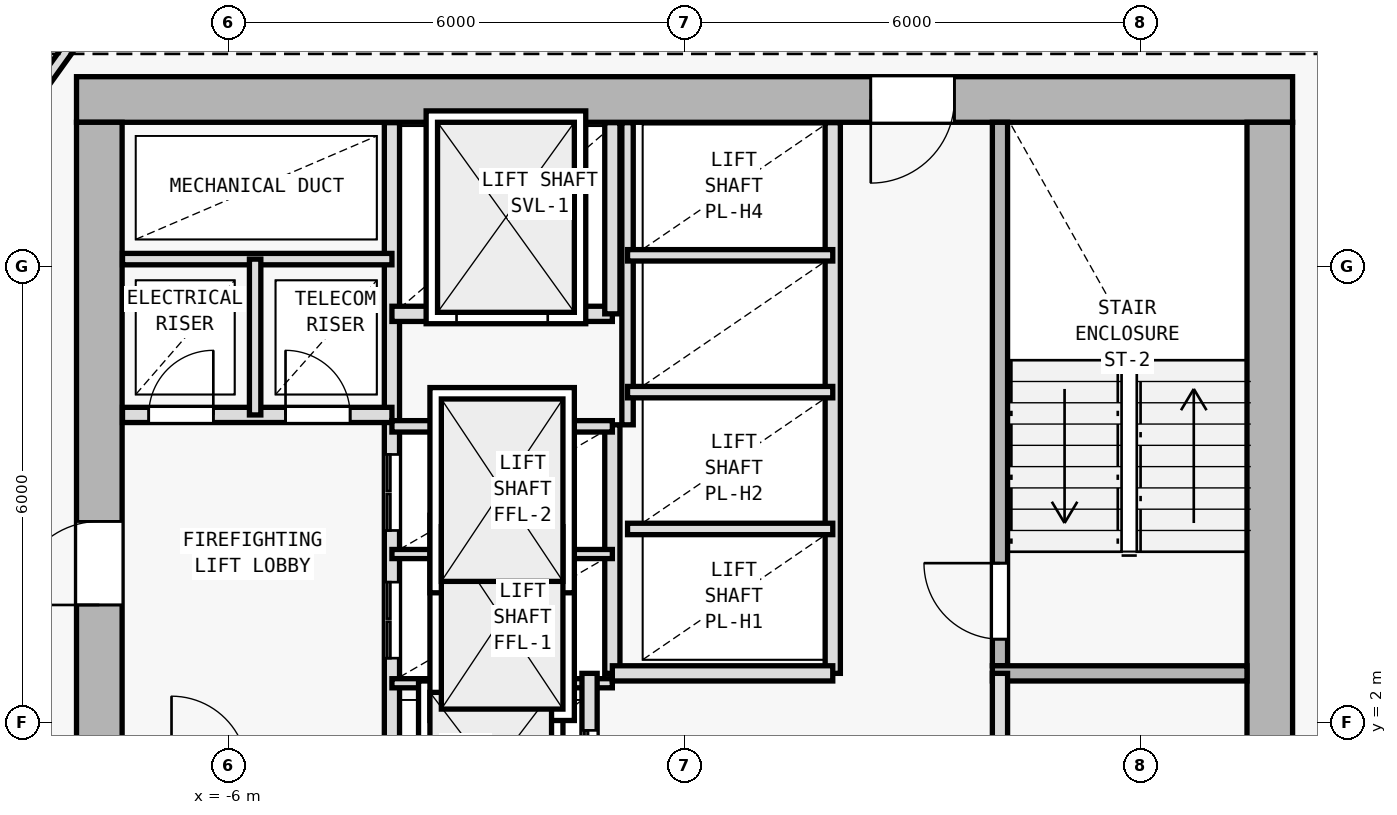
"""IFC4 building model, lengths in metres.
Left out: names, types, materials, properties, quantities, classifications, styles, units other than length and angle.
Written with IfcOpenShell. Run it as: python <this file> out.ifc"""

import sys

from ifc_helpers import new_model, si_unit, direction, frame, frame_2d, origin, origin_2d, place, context, subcontext, project, spatial, rectangle, i_section, extrude, element, fill, save


model = new_model("IFC4")
c1 = context("Model", 3, precision=1e-05, world=origin(), true_north=direction((0.0, 1.0)))
c2 = subcontext(c1, "Body", "Model", "MODEL_VIEW")
j1 = project(units=[si_unit("LENGTHUNIT", "METRE"), si_unit("PLANEANGLEUNIT", "RADIAN")], contexts=[c1])
p1 = place(None, origin())
s1 = spatial("IfcSite", under=j1, at=p1, CompositionType="ELEMENT")
p2 = place(p1, origin())
s2 = spatial("IfcBuilding", under=s1, at=p2, CompositionType="ELEMENT")
p3 = place(p2, frame((0.0, 0.0, 118.5)))
s3 = spatial("IfcBuildingStorey", under=s2, at=p3, CompositionType="ELEMENT", Elevation=118.5)
for number, where, z_axis, x_axis in (
    (1, (7.7, 10.2, 0.0), (0.0, 0.0, 1.0), (1.0, 0.0, 0.0)),
    (2, (-7.7, 10.2, 0.0), (0.0, 0.0, 1.0), (1.0, 0.0, 0.0)),
    (3, (-7.7, 2.0, 0.0), (0.0, 0.0, 1.0), (1.0, 0.0, 0.0)),
):
    element("IfcColumn", number, at=place(p3, frame(where, z_axis=z_axis, x_axis=x_axis)), inside=s3, PredefinedType="COLUMN", context=c2, shape_type="SweptSolid", body=[
        extrude(i_section(OverallWidth=0.409, OverallDepth=0.425, WebThickness=0.021, FlangeThickness=0.034, FilletRadius=0.015, at=origin_2d()), origin(), (0.0, 0.0, 1.0), 3.6),
    ])
p4 = place(p3, frame((8.0, 10.2, 0.0), z_axis=(0.0, 0.0, 1.0), x_axis=(-1.0, 0.0, 0.0)))
e4 = element("IfcWall", 4, at=p4, inside=s3, PredefinedType="SHEAR", context=c2, shape_type="SweptSolid", body=[
    extrude(rectangle(XDim=16.0, YDim=0.6, at=frame_2d((8.0, 0.0))), origin(), (0.0, 0.0, 1.0), 3.35),
])
p5 = place(p4, frame((4.45, 0.0, 0.0)))
e5 = element("IfcOpeningElement", 5, at=p5, cuts=e4, PredefinedType="OPENING", context=c2, shape_type="SweptSolid", body=[
    extrude(rectangle(XDim=1.1, YDim=2.15, at=frame_2d((0.55, 1.075))), frame((0.0, 0.31, 0.0), z_axis=(0.0, -1.0, 0.0), x_axis=(1.0, 0.0, 0.0)), (0.0, 0.0, 1.0), 0.62),
])
p6 = place(p3, frame((-7.7, -9.1, 0.0), z_axis=(0.0, 0.0, 1.0), x_axis=(0.0, 1.0, 0.0)))
e6 = element("IfcWall", 6, at=p6, inside=s3, PredefinedType="SHEAR", context=c2, shape_type="SweptSolid", body=[
    extrude(rectangle(XDim=19.0, YDim=0.6, at=frame_2d((9.5, 0.0))), origin(), (0.0, 0.0, 1.0), 3.35),
])
p7 = place(p6, frame((12.65, 0.0, 0.0)))
e7 = element("IfcOpeningElement", 7, at=p7, cuts=e6, PredefinedType="OPENING", context=c2, shape_type="SweptSolid", body=[
    extrude(rectangle(XDim=1.1, YDim=2.15, at=frame_2d((0.55, 1.075))), frame((0.0, 0.31, 0.0), z_axis=(0.0, -1.0, 0.0), x_axis=(1.0, 0.0, 0.0)), (0.0, 0.0, 1.0), 0.62),
])
p8 = place(p3, frame((7.7, 9.9, 0.0), z_axis=(0.0, 0.0, 1.0), x_axis=(0.0, -1.0, 0.0)))
e8 = element("IfcWall", 8, at=p8, inside=s3, PredefinedType="SHEAR", context=c2, shape_type="SweptSolid", body=[
    extrude(rectangle(XDim=19.0, YDim=0.6, at=frame_2d((9.5, 0.0))), origin(), (0.0, 0.0, 1.0), 3.35),
])
p9 = place(p3, frame((-3.85, 1.35, 0.0), z_axis=(0.0, 0.0, 1.0), x_axis=(0.0, 1.0, 0.0)))
e9 = element("IfcWall", 9, at=p9, inside=s3, PredefinedType="SOLIDWALL", context=c2, shape_type="SweptSolid", body=[
    extrude(rectangle(XDim=8.545, YDim=0.2, at=frame_2d((4.272, 0.0))), origin(), (0.0, 0.0, 1.0), 3.35),
])
p10 = place(p9, frame((1.5, 0.0, 0.0)))
e10 = element("IfcOpeningElement", 10, at=p10, cuts=e9, PredefinedType="OPENING", context=c2, shape_type="SweptSolid", body=[
    extrude(rectangle(XDim=1.0, YDim=2.15, at=frame_2d((0.5, 1.075))), frame((0.0, 0.11, 0.0), z_axis=(0.0, -1.0, 0.0), x_axis=(1.0, 0.0, 0.0)), (0.0, 0.0, 1.0), 0.22),
])
p11 = place(p9, frame((3.18, 0.0, 0.0)))
e11 = element("IfcOpeningElement", 11, at=p11, cuts=e9, PredefinedType="OPENING", context=c2, shape_type="SweptSolid", body=[
    extrude(rectangle(XDim=1.0, YDim=2.15, at=frame_2d((0.5, 1.075))), frame((0.0, 0.11, 0.0), z_axis=(0.0, -1.0, 0.0), x_axis=(1.0, 0.0, 0.0)), (0.0, 0.0, 1.0), 0.22),
])
p12 = place(p3, frame((-7.395, 6.05, 0.0), z_axis=(0.0, 0.0, 1.0), x_axis=(1.0, 0.0, 0.0)))
e12 = element("IfcWall", 12, at=p12, inside=s3, PredefinedType="SOLIDWALL", context=c2, shape_type="SweptSolid", body=[
    extrude(rectangle(XDim=3.545, YDim=0.2, at=frame_2d((1.772, 0.0))), origin(), (0.0, 0.0, 1.0), 3.35),
])
p13 = place(p12, frame((0.345, 0.0, 0.0)))
e13 = element("IfcOpeningElement", 13, at=p13, cuts=e12, PredefinedType="OPENING", context=c2, shape_type="SweptSolid", body=[
    extrude(rectangle(XDim=0.85, YDim=2.1, at=frame_2d((0.425, 1.05))), frame((0.0, 0.11, 0.0), z_axis=(0.0, -1.0, 0.0), x_axis=(1.0, 0.0, 0.0)), (0.0, 0.0, 1.0), 0.22),
])
p14 = place(p12, frame((2.145, 0.0, 0.0)))
e14 = element("IfcOpeningElement", 14, at=p14, cuts=e12, PredefinedType="OPENING", context=c2, shape_type="SweptSolid", body=[
    extrude(rectangle(XDim=0.85, YDim=2.1, at=frame_2d((0.425, 1.05))), frame((0.0, 0.11, 0.0), z_axis=(0.0, -1.0, 0.0), x_axis=(1.0, 0.0, 0.0)), (0.0, 0.0, 1.0), 0.22),
])
p15 = place(p3, frame((-7.395, 8.1, 0.0), z_axis=(0.0, 0.0, 1.0), x_axis=(1.0, 0.0, 0.0)))
e15 = element("IfcWall", 15, at=p15, inside=s3, PredefinedType="PARTITIONING", context=c2, shape_type="SweptSolid", body=[
    extrude(rectangle(XDim=3.545, YDim=0.15, at=frame_2d((1.772, 0.0))), origin(), (0.0, 0.0, 1.0), 3.35),
])
p16 = place(p3, frame((-5.65, 6.05, 0.0), z_axis=(0.0, 0.0, 1.0), x_axis=(0.0, 1.0, 0.0)))
e16 = element("IfcWall", 16, at=p16, inside=s3, PredefinedType="PARTITIONING", context=c2, shape_type="SweptSolid", body=[
    extrude(rectangle(XDim=2.05, YDim=0.15, at=frame_2d((1.025, 0.0))), origin(), (0.0, 0.0, 1.0), 3.35),
])
p17 = place(p3, frame((4.15, 2.75, 0.0), z_axis=(0.0, 0.0, 1.0), x_axis=(0.0, 1.0, 0.0)))
e17 = element("IfcWall", 17, at=p17, inside=s3, PredefinedType="SOLIDWALL", context=c2, shape_type="SweptSolid", body=[
    extrude(rectangle(XDim=7.15, YDim=0.2, at=frame_2d((3.575, 0.0))), origin(), (0.0, 0.0, 1.0), 3.35),
])
p18 = place(p17, frame((0.35, 0.0, 0.0)))
e18 = element("IfcOpeningElement", 18, at=p18, cuts=e17, PredefinedType="OPENING", context=c2, shape_type="SweptSolid", body=[
    extrude(rectangle(XDim=1.0, YDim=2.15, at=frame_2d((0.5, 1.075))), frame((0.0, 0.11, 0.0), z_axis=(0.0, -1.0, 0.0), x_axis=(1.0, 0.0, 0.0)), (0.0, 0.0, 1.0), 0.22),
])
p19 = place(p3, frame((4.05, 2.65, 0.0), z_axis=(0.0, 0.0, 1.0), x_axis=(1.0, 0.0, 0.0)))
e19 = element("IfcWall", 19, at=p19, inside=s3, PredefinedType="SOLIDWALL", context=c2, shape_type="SweptSolid", body=[
    extrude(rectangle(XDim=3.35, YDim=0.2, at=frame_2d((1.675, 0.0))), origin(), (0.0, 0.0, 1.0), 3.35),
])
p20 = place(p3, frame((-0.95, 2.65, 0.0), z_axis=(0.0, 0.0, 1.0), x_axis=(0.0, 1.0, 0.0)))
e20 = element("IfcWall", 20, at=p20, inside=s3, PredefinedType="SOLIDWALL", context=c2, shape_type="SweptSolid", body=[
    extrude(rectangle(XDim=3.27, YDim=0.2, at=frame_2d((1.635, 0.0))), origin(), (0.0, 0.0, 1.0), 3.35),
])
for number, where, z_axis, x_axis in (
    (21, (-3.85, 2.52, 0.0), (0.0, 0.0, 1.0), (1.0, 0.0, 0.0)),
    (22, (-3.85, 4.22, 0.0), (0.0, 0.0, 1.0), (1.0, 0.0, 0.0)),
):
    element("IfcWall", number, at=place(p3, frame(where, z_axis=z_axis, x_axis=x_axis)), inside=s3, PredefinedType="PARTITIONING", context=c2, shape_type="SweptSolid", body=[
        extrude(rectangle(XDim=2.9, YDim=0.12, at=frame_2d((1.45, 0.0))), origin(), (0.0, 0.0, 1.0), 3.35),
    ])
p21 = place(p3, frame((-3.85, 5.9, 0.0), z_axis=(0.0, 0.0, 1.0), x_axis=(1.0, 0.0, 0.0)))
e23 = element("IfcWall", 23, at=p21, inside=s3, PredefinedType="PARTITIONING", context=c2, shape_type="SweptSolid", body=[
    extrude(rectangle(XDim=2.9, YDim=0.15, at=frame_2d((1.45, 0.0))), origin(), (0.0, 0.0, 1.0), 3.35),
])
p22 = place(p3, frame((-3.85, 7.38, 0.0), z_axis=(0.0, 0.0, 1.0), x_axis=(1.0, 0.0, 0.0)))
e24 = element("IfcWall", 24, at=p22, inside=s3, PredefinedType="SOLIDWALL", context=c2, shape_type="SweptSolid", body=[
    extrude(rectangle(XDim=2.9, YDim=0.2, at=frame_2d((1.45, 0.0))), origin(), (0.0, 0.0, 1.0), 3.35),
])
p23 = place(p22, frame((0.85, 0.0, 0.0)))
e25 = element("IfcOpeningElement", 25, at=p23, cuts=e24, PredefinedType="OPENING", context=c2, shape_type="SweptSolid", body=[
    extrude(rectangle(XDim=1.2, YDim=2.2, at=frame_2d((0.6, 1.1))), frame((0.0, 0.11, 0.0), z_axis=(0.0, -1.0, 0.0), x_axis=(1.0, 0.0, 0.0)), (0.0, 0.0, 1.0), 0.22),
])
p24 = place(p3, frame((-0.95, 7.38, 0.0), z_axis=(0.0, 0.0, 1.0), x_axis=(0.0, 1.0, 0.0)))
e26 = element("IfcWall", 26, at=p24, inside=s3, PredefinedType="SOLIDWALL", context=c2, shape_type="SweptSolid", body=[
    extrude(rectangle(XDim=2.515, YDim=0.2, at=frame_2d((1.258, 0.0))), origin(), (0.0, 0.0, 1.0), 3.35),
])
p25 = place(p3, frame((4.15, -6.05, 0.0), z_axis=(0.0, 0.0, 1.0), x_axis=(0.0, 1.0, 0.0)))
e27 = element("IfcWall", 27, at=p25, inside=s3, PredefinedType="SOLIDWALL", context=c2, shape_type="SweptSolid", body=[
    extrude(rectangle(XDim=8.7, YDim=0.2, at=frame_2d((4.35, 0.0))), origin(), (0.0, 0.0, 1.0), 3.35),
])
p26 = place(p25, frame((3.6, 0.0, 0.0)))
e28 = element("IfcOpeningElement", 28, at=p26, cuts=e27, PredefinedType="OPENING", context=c2, shape_type="SweptSolid", body=[
    extrude(rectangle(XDim=0.95, YDim=2.1, at=frame_2d((0.475, 1.05))), frame((0.0, 0.11, 0.0), z_axis=(0.0, -1.0, 0.0), x_axis=(1.0, 0.0, 0.0)), (0.0, 0.0, 1.0), 0.22),
])
p27 = place(p3, frame((-1.25, -6.05, 0.0), z_axis=(0.0, 0.0, 1.0), x_axis=(0.0, 1.0, 0.0)))
e29 = element("IfcWall", 29, at=p27, inside=s3, PredefinedType="SOLIDWALL", context=c2, shape_type="SweptSolid", body=[
    extrude(rectangle(XDim=8.7, YDim=0.2, at=frame_2d((4.35, 0.0))), origin(), (0.0, 0.0, 1.0), 3.35),
])
p28 = place(p27, frame((0.55, 0.0, 0.0)))
e30 = element("IfcOpeningElement", 30, at=p28, cuts=e29, PredefinedType="OPENING", context=c2, shape_type="SweptSolid", body=[
    extrude(rectangle(XDim=1.1, YDim=2.15, at=frame_2d((0.55, 1.075))), frame((0.0, 0.11, 0.0), z_axis=(0.0, -1.0, 0.0), x_axis=(1.0, 0.0, 0.0)), (0.0, 0.0, 1.0), 0.22),
])
p29 = place(p27, frame((2.65, 0.0, 0.0)))
e31 = element("IfcOpeningElement", 31, at=p29, cuts=e29, PredefinedType="OPENING", context=c2, shape_type="SweptSolid", body=[
    extrude(rectangle(XDim=1.1, YDim=2.15, at=frame_2d((0.55, 1.075))), frame((0.0, 0.11, 0.0), z_axis=(0.0, -1.0, 0.0), x_axis=(1.0, 0.0, 0.0)), (0.0, 0.0, 1.0), 0.22),
])
p30 = place(p27, frame((4.75, 0.0, 0.0)))
e32 = element("IfcOpeningElement", 32, at=p30, cuts=e29, PredefinedType="OPENING", context=c2, shape_type="SweptSolid", body=[
    extrude(rectangle(XDim=1.1, YDim=2.15, at=frame_2d((0.55, 1.075))), frame((0.0, 0.11, 0.0), z_axis=(0.0, -1.0, 0.0), x_axis=(1.0, 0.0, 0.0)), (0.0, 0.0, 1.0), 0.22),
])
p31 = place(p27, frame((6.85, 0.0, 0.0)))
e33 = element("IfcOpeningElement", 33, at=p31, cuts=e29, PredefinedType="OPENING", context=c2, shape_type="SweptSolid", body=[
    extrude(rectangle(XDim=1.1, YDim=2.15, at=frame_2d((0.55, 1.075))), frame((0.0, 0.11, 0.0), z_axis=(0.0, -1.0, 0.0), x_axis=(1.0, 0.0, 0.0)), (0.0, 0.0, 1.0), 0.22),
])
p32 = place(p3, frame((1.95, 2.65, 0.0), z_axis=(0.0, 0.0, 1.0), x_axis=(0.0, 1.0, 0.0)))
e34 = element("IfcWall", 34, at=p32, inside=s3, PredefinedType="SOLIDWALL", context=c2, shape_type="SweptSolid", body=[
    extrude(rectangle(XDim=7.245, YDim=0.2, at=frame_2d((3.623, 0.0))), origin(), (0.0, 0.0, 1.0), 3.35),
])
p33 = place(p3, frame((-0.95, 2.65, 0.0), z_axis=(0.0, 0.0, 1.0), x_axis=(1.0, 0.0, 0.0)))
e35 = element("IfcWall", 35, at=p33, inside=s3, PredefinedType="SOLIDWALL", context=c2, shape_type="SweptSolid", body=[
    extrude(rectangle(XDim=2.9, YDim=0.2, at=frame_2d((1.45, 0.0))), origin(), (0.0, 0.0, 1.0), 3.35),
])
p34 = place(p3, frame((-0.75, 5.92, 0.0), z_axis=(0.0, 0.0, 1.0), x_axis=(0.0, 1.0, 0.0)))
e36 = element("IfcWall", 36, at=p34, inside=s3, PredefinedType="PARTITIONING", context=c2, shape_type="SweptSolid", body=[
    extrude(rectangle(XDim=3.975, YDim=0.15, at=frame_2d((1.988, 0.0))), origin(), (0.0, 0.0, 1.0), 3.35),
])
for number, where, z_axis, x_axis in (
    (37, (-0.75, 4.55, 0.0), (0.0, 0.0, 1.0), (1.0, 0.0, 0.0)),
    (38, (-0.75, 6.35, 0.0), (0.0, 0.0, 1.0), (1.0, 0.0, 0.0)),
    (39, (-0.75, 8.15, 0.0), (0.0, 0.0, 1.0), (1.0, 0.0, 0.0)),
):
    element("IfcWall", number, at=place(p3, frame(where, z_axis=z_axis, x_axis=x_axis)), inside=s3, PredefinedType="PARTITIONING", context=c2, shape_type="SweptSolid", body=[
        extrude(rectangle(XDim=2.7, YDim=0.15, at=frame_2d((1.35, 0.0))), origin(), (0.0, 0.0, 1.0), 3.35),
    ])
p35 = place(p3, frame((-9.86, 8.426, 0.0), z_axis=(0.0, 0.0, 1.0), x_axis=(0.582449511476, 0.812866881218, 0.0)))
e40 = element("IfcWall", 40, at=p35, inside=s3, PredefinedType="PARTITIONING", context=c2, shape_type="SweptSolid", body=[
    extrude(rectangle(XDim=4.84, YDim=0.15, at=frame_2d((2.42, 0.0))), origin(), (0.0, 0.0, 1.0), 2.925),
])
p36 = place(p3, frame((7.023, 12.36, 0.0), z_axis=(0.0, 0.0, 1.0), x_axis=(0.84376480085, -0.536713108511, 0.0)))
e41 = element("IfcWall", 41, at=p36, inside=s3, PredefinedType="PARTITIONING", context=c2, shape_type="SweptSolid", body=[
    extrude(rectangle(XDim=7.297, YDim=0.15, at=frame_2d((3.648, 0.0))), origin(), (0.0, 0.0, 1.0), 2.825),
])
p37 = place(p36, frame((2.595, 0.0, 0.0)))
e42 = element("IfcOpeningElement", 42, at=p37, cuts=e41, PredefinedType="OPENING", context=c2, shape_type="SweptSolid", body=[
    extrude(rectangle(XDim=0.9, YDim=2.1, at=frame_2d((0.45, 1.05))), frame((0.0, 0.085, 0.0), z_axis=(0.0, -1.0, 0.0), x_axis=(1.0, 0.0, 0.0)), (0.0, 0.0, 1.0), 0.17),
])
p38 = place(p7, origin())
e43 = element("IfcDoor", 43, at=p38, inside=s3, OperationType="SINGLE_SWING_LEFT", PredefinedType="DOOR", context=c2, shape_type="SweptSolid", body=[
    extrude(rectangle(XDim=1.1, YDim=2.15, at=frame_2d((0.55, 1.075))), frame((0.0, 0.025, 0.0), z_axis=(0.0, -1.0, 0.0), x_axis=(1.0, 0.0, 0.0)), (0.0, 0.0, 1.0), 0.05),
])
fill(e7, e43)
p39 = place(p5, origin())
e44 = element("IfcDoor", 44, at=p39, inside=s3, OperationType="SINGLE_SWING_RIGHT", PredefinedType="DOOR", context=c2, shape_type="SweptSolid", body=[
    extrude(rectangle(XDim=1.1, YDim=2.15, at=frame_2d((0.55, 1.075))), frame((0.0, 0.025, 0.0), z_axis=(0.0, -1.0, 0.0), x_axis=(1.0, 0.0, 0.0)), (0.0, 0.0, 1.0), 0.05),
])
fill(e5, e44)
p40 = place(p13, origin())
e45 = element("IfcDoor", 45, at=p40, inside=s3, OperationType="SINGLE_SWING_RIGHT", PredefinedType="DOOR", context=c2, shape_type="SweptSolid", body=[
    extrude(rectangle(XDim=0.85, YDim=2.1, at=frame_2d((0.425, 1.05))), frame((0.0, 0.025, 0.0), z_axis=(0.0, -1.0, 0.0), x_axis=(1.0, 0.0, 0.0)), (0.0, 0.0, 1.0), 0.05),
])
fill(e13, e45)
p41 = place(p14, origin())
e46 = element("IfcDoor", 46, at=p41, inside=s3, OperationType="SINGLE_SWING_LEFT", PredefinedType="DOOR", context=c2, shape_type="SweptSolid", body=[
    extrude(rectangle(XDim=0.85, YDim=2.1, at=frame_2d((0.425, 1.05))), frame((0.0, 0.025, 0.0), z_axis=(0.0, -1.0, 0.0), x_axis=(1.0, 0.0, 0.0)), (0.0, 0.0, 1.0), 0.05),
])
fill(e14, e46)
p42 = place(p18, origin())
e47 = element("IfcDoor", 47, at=p42, inside=s3, OperationType="SINGLE_SWING_RIGHT", PredefinedType="DOOR", context=c2, shape_type="SweptSolid", body=[
    extrude(rectangle(XDim=1.0, YDim=2.15, at=frame_2d((0.5, 1.075))), frame((0.0, 0.025, 0.0), z_axis=(0.0, -1.0, 0.0), x_axis=(1.0, 0.0, 0.0)), (0.0, 0.0, 1.0), 0.05),
])
fill(e18, e47)
p43 = place(p23, origin())
e48 = element("IfcDoor", 48, at=p43, inside=s3, OperationType="DOUBLE_DOOR_SLIDING", PredefinedType="DOOR", context=c2, shape_type="SweptSolid", body=[
    extrude(rectangle(XDim=1.2, YDim=2.2, at=frame_2d((0.6, 1.1))), frame((0.0, 0.025, 0.0), z_axis=(0.0, -1.0, 0.0), x_axis=(1.0, 0.0, 0.0)), (0.0, 0.0, 1.0), 0.05),
])
fill(e25, e48)
p44 = place(p31, origin())
e49 = element("IfcDoor", 49, at=p44, inside=s3, OperationType="DOUBLE_DOOR_SLIDING", PredefinedType="DOOR", context=c2, shape_type="SweptSolid", body=[
    extrude(rectangle(XDim=1.1, YDim=2.15, at=frame_2d((0.55, 1.075))), frame((0.0, 0.025, 0.0), z_axis=(0.0, -1.0, 0.0), x_axis=(1.0, 0.0, 0.0)), (0.0, 0.0, 1.0), 0.05),
])
fill(e33, e49)
p45 = place(p10, origin())
e50 = element("IfcDoor", 50, at=p45, inside=s3, OperationType="DOUBLE_DOOR_SLIDING", PredefinedType="DOOR", context=c2, shape_type="SweptSolid", body=[
    extrude(rectangle(XDim=1.0, YDim=2.15, at=frame_2d((0.5, 1.075))), frame((0.0, 0.025, 0.0), z_axis=(0.0, -1.0, 0.0), x_axis=(1.0, 0.0, 0.0)), (0.0, 0.0, 1.0), 0.05),
])
fill(e10, e50)
p46 = place(p11, origin())
e51 = element("IfcDoor", 51, at=p46, inside=s3, OperationType="DOUBLE_DOOR_SLIDING", PredefinedType="DOOR", context=c2, shape_type="SweptSolid", body=[
    extrude(rectangle(XDim=1.0, YDim=2.15, at=frame_2d((0.5, 1.075))), frame((0.0, 0.025, 0.0), z_axis=(0.0, -1.0, 0.0), x_axis=(1.0, 0.0, 0.0)), (0.0, 0.0, 1.0), 0.05),
])
fill(e11, e51)
save(model, sys.argv[1])
